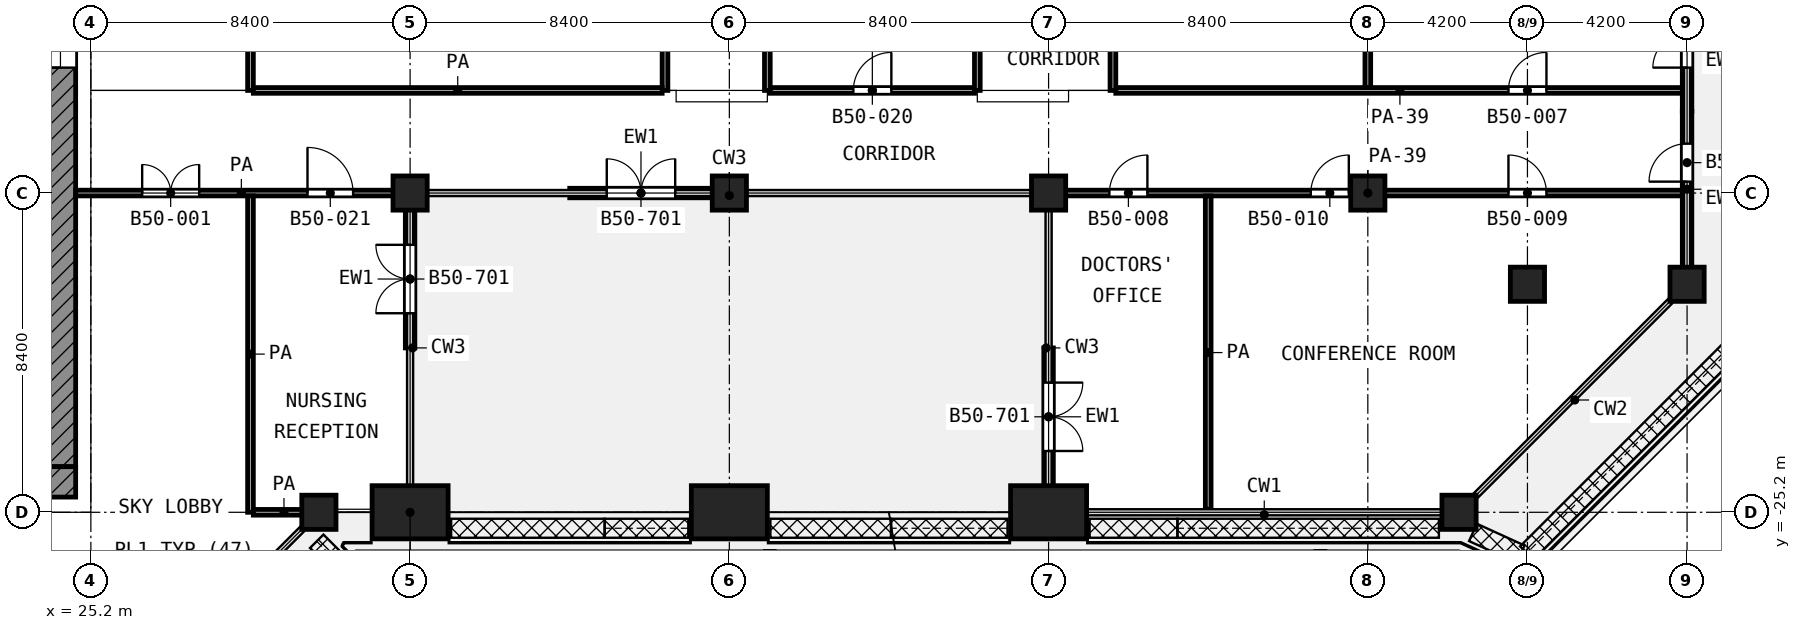
"""IFC4 building model, lengths in metres.
Left out: names, types, materials, properties, quantities, classifications, styles, units other than length and angle.
Written with IfcOpenShell. Run it as: python <this file> out.ifc"""

import sys

from ifc_helpers import new_model, si_unit, direction, frame, frame_2d, origin, origin_2d, place, context, subcontext, project, spatial, rectangle, extrude, element, fill, save


model = new_model("IFC4")
c1 = context("Model", 3, precision=1e-05, world=origin(), true_north=direction((0.0, 1.0)))
c2 = subcontext(c1, "Body", "Model", "MODEL_VIEW")
j1 = project(units=[si_unit("LENGTHUNIT", "METRE"), si_unit("PLANEANGLEUNIT", "RADIAN")], contexts=[c1])
p1 = place(None, origin())
s1 = spatial("IfcSite", under=j1, at=p1, CompositionType="ELEMENT")
p2 = place(p1, origin())
s2 = spatial("IfcBuilding", under=s1, at=p2, CompositionType="ELEMENT")
p3 = place(p2, frame((0.0, 0.0, 218.0)))
s3 = spatial("IfcBuildingStorey", under=s2, at=p3, CompositionType="ELEMENT", Elevation=218.0)
for number, where, z_axis, x_axis in (
    (1, (33.6, -16.8, 0.0), (0.0, 0.0, 1.0), (1.0, 0.0, 0.0)),
    (2, (42.0, -16.8, 0.0), (0.0, 0.0, 1.0), (1.0, 0.0, 0.0)),
    (3, (50.4, -16.8, 0.0), (0.0, 0.0, 1.0), (1.0, 0.0, 0.0)),
    (4, (58.8, -16.8, 0.0), (0.0, 0.0, 1.0), (1.0, 0.0, 0.0)),
    (5, (63.0, -19.2, 0.0), (0.0, 0.0, 1.0), (1.0, 0.0, 0.0)),
    (6, (67.2, -19.2, 0.0), (0.0, 0.0, 1.0), (1.0, 0.0, 0.0)),
    (7, (31.2, -25.2, 0.0), (0.0, 0.0, 1.0), (1.0, 0.0, 0.0)),
):
    element("IfcColumn", number, at=place(p3, frame(where, z_axis=z_axis, x_axis=x_axis)), inside=s3, PredefinedType="COLUMN", context=c2, shape_type="SweptSolid", body=[
        extrude(rectangle(XDim=0.9, YDim=0.9, at=origin_2d()), origin(), (0.0, 0.0, 1.0), 4.2),
    ])
for number, where, z_axis, x_axis in (
    (8, (42.0, -25.2, 0.0), (0.0, 0.0, 1.0), (-1.0, 0.0, 0.0)),
    (9, (50.4, -25.2, 0.0), (0.0, 0.0, 1.0), (-1.0, 0.0, 0.0)),
):
    element("IfcColumn", number, at=place(p3, frame(where, z_axis=z_axis, x_axis=x_axis)), inside=s3, PredefinedType="COLUMN", context=c2, shape_type="SweptSolid", body=[
        extrude(rectangle(XDim=2.0, YDim=1.4, at=origin_2d()), origin(), (0.0, 0.0, 1.0), 4.2),
    ])
p4 = place(p3, frame((61.2, -25.2, 0.0), z_axis=(0.0, 0.0, 1.0), x_axis=(1.0, 0.0, 0.0)))
e10 = element("IfcColumn", 10, at=p4, inside=s3, PredefinedType="COLUMN", context=c2, shape_type="SweptSolid", body=[
    extrude(rectangle(XDim=0.9, YDim=0.9, at=origin_2d()), origin(), (0.0, 0.0, 1.0), 4.2),
])
p5 = place(p3, frame((33.6, -25.2, 0.0), z_axis=(0.0, 0.0, 1.0), x_axis=(-1.0, 0.0, 0.0)))
e11 = element("IfcColumn", 11, at=p5, inside=s3, PredefinedType="COLUMN", context=c2, shape_type="SweptSolid", body=[
    extrude(rectangle(XDim=2.0, YDim=1.4, at=origin_2d()), origin(), (0.0, 0.0, 1.0), 4.2),
])
p6 = place(p3, frame((33.6, -20.875, 0.0), z_axis=(0.0, 0.0, 1.0), x_axis=(0.0, 1.0, 0.0)))
e12 = element("IfcWall", 12, at=p6, inside=s3, PredefinedType="SOLIDWALL", context=c2, shape_type="SweptSolid", body=[
    extrude(rectangle(XDim=3.625, YDim=0.25, at=frame_2d((1.812, 0.0))), origin(), (0.0, 0.0, 1.0), 3.46),
])
p7 = place(p6, frame((0.913, 0.0, 0.0)))
e13 = element("IfcOpeningElement", 13, at=p7, cuts=e12, PredefinedType="OPENING", context=c2, shape_type="SweptSolid", body=[
    extrude(rectangle(XDim=1.8, YDim=2.1, at=frame_2d((0.9, 1.05))), frame((0.0, 0.135, 0.0), z_axis=(0.0, -1.0, 0.0), x_axis=(1.0, 0.0, 0.0)), (0.0, 0.0, 1.0), 0.27),
])
p8 = place(p3, frame((37.8, -16.8, 0.0), z_axis=(0.0, 0.0, 1.0), x_axis=(1.0, 0.0, 0.0)))
e14 = element("IfcWall", 14, at=p8, inside=s3, PredefinedType="SOLIDWALL", context=c2, shape_type="SweptSolid", body=[
    extrude(rectangle(XDim=3.75, YDim=0.25, at=frame_2d((1.875, 0.0))), origin(), (0.0, 0.0, 1.0), 3.46),
])
p9 = place(p8, frame((0.975, 0.0, 0.0)))
e15 = element("IfcOpeningElement", 15, at=p9, cuts=e14, PredefinedType="OPENING", context=c2, shape_type="SweptSolid", body=[
    extrude(rectangle(XDim=1.8, YDim=2.1, at=frame_2d((0.9, 1.05))), frame((0.0, 0.135, 0.0), z_axis=(0.0, -1.0, 0.0), x_axis=(1.0, 0.0, 0.0)), (0.0, 0.0, 1.0), 0.27),
])
p10 = place(p3, frame((50.4, -20.875, 0.0), z_axis=(0.0, 0.0, 1.0), x_axis=(0.0, -1.0, 0.0)))
e16 = element("IfcWall", 16, at=p10, inside=s3, PredefinedType="SOLIDWALL", context=c2, shape_type="SweptSolid", body=[
    extrude(rectangle(XDim=3.625, YDim=0.25, at=frame_2d((1.812, 0.0))), origin(), (0.0, 0.0, 1.0), 3.46),
])
p11 = place(p10, frame((0.913, 0.0, 0.0)))
e17 = element("IfcOpeningElement", 17, at=p11, cuts=e16, PredefinedType="OPENING", context=c2, shape_type="SweptSolid", body=[
    extrude(rectangle(XDim=1.8, YDim=2.1, at=frame_2d((0.9, 1.05))), frame((0.0, 0.135, 0.0), z_axis=(0.0, -1.0, 0.0), x_axis=(1.0, 0.0, 0.0)), (0.0, 0.0, 1.0), 0.27),
])
p12 = place(p3, frame((67.2, -18.75, 0.0), z_axis=(0.0, 0.0, 1.0), x_axis=(0.0, 1.0, 0.0)))
e18 = element("IfcWall", 18, at=p12, inside=s3, PredefinedType="SOLIDWALL", context=c2, shape_type="SweptSolid", body=[
    extrude(rectangle(XDim=4.1, YDim=0.25, at=frame_2d((2.05, 0.0))), origin(), (0.0, 0.0, 1.0), 2.58),
])
p13 = place(p12, frame((2.25, 0.0, 0.0)))
e19 = element("IfcOpeningElement", 19, at=p13, cuts=e18, PredefinedType="OPENING", context=c2, shape_type="SweptSolid", body=[
    extrude(rectangle(XDim=1.0, YDim=2.1, at=frame_2d((0.5, 1.05))), frame((0.0, 0.135, 0.0), z_axis=(0.0, -1.0, 0.0), x_axis=(1.0, 0.0, 0.0)), (0.0, 0.0, 1.0), 0.27),
])
p14 = place(p3, frame((67.2, -14.65, 0.0), z_axis=(0.0, 0.0, 1.0), x_axis=(0.0, 1.0, 0.0)))
e20 = element("IfcWall", 20, at=p14, inside=s3, PredefinedType="SOLIDWALL", context=c2, shape_type="SweptSolid", body=[
    extrude(rectangle(XDim=4.1, YDim=0.25, at=frame_2d((2.05, 0.0))), origin(), (0.0, 0.0, 1.0), 2.58),
])
p15 = place(p14, frame((1.15, 0.0, 0.0)))
e21 = element("IfcOpeningElement", 21, at=p15, cuts=e20, PredefinedType="OPENING", context=c2, shape_type="SweptSolid", body=[
    extrude(rectangle(XDim=1.8, YDim=2.1, at=frame_2d((0.9, 1.05))), frame((0.0, 0.135, 0.0), z_axis=(0.0, -1.0, 0.0), x_axis=(1.0, 0.0, 0.0)), (0.0, 0.0, 1.0), 0.27),
])
p16 = place(p3, frame((24.4, -24.0, 0.0), z_axis=(0.0, 0.0, 1.0), x_axis=(0.0, 1.0, 0.0)))
e22 = element("IfcWall", 22, at=p16, inside=s3, PredefinedType="SHEAR", context=c2, shape_type="SweptSolid", body=[
    extrude(rectangle(XDim=18.6, YDim=0.8, at=frame_2d((9.3, 0.0))), origin(), (0.0, 0.0, 1.0), 3.6),
])
p17 = place(p16, frame((10.5, 0.0, 0.0)))
e23 = element("IfcOpeningElement", 23, at=p17, cuts=e22, PredefinedType="OPENING", context=c2, shape_type="SweptSolid", body=[
    extrude(rectangle(XDim=1.8, YDim=2.1, at=frame_2d((0.9, 1.05))), frame((0.0, 0.41, 0.0), z_axis=(0.0, -1.0, 0.0), x_axis=(1.0, 0.0, 0.0)), (0.0, 0.0, 1.0), 0.82),
])
p18 = place(p3, frame((24.4, -24.8, 0.0), z_axis=(0.0, 0.0, 1.0), x_axis=(0.0, 1.0, 0.0)))
e24 = element("IfcWall", 24, at=p18, inside=s3, PredefinedType="SHEAR", context=c2, shape_type="SweptSolid", body=[
    extrude(rectangle(XDim=0.8, YDim=0.8, at=frame_2d((0.4, 0.0))), origin(), (0.0, 0.0, 1.0), 3.6),
])
p19 = place(p3, frame((29.475, -25.2, 0.0), z_axis=(0.0, 0.0, 1.0), x_axis=(1.0, 0.0, 0.0)))
e25 = element("IfcWall", 25, at=p19, inside=s3, PredefinedType="PARTITIONING", context=c2, shape_type="SweptSolid", body=[
    extrude(rectangle(XDim=1.612, YDim=0.15, at=frame_2d((0.806, 0.0))), origin(), (0.0, 0.0, 1.0), 3.6),
])
p20 = place(p3, frame((24.8, -16.8, 0.0), z_axis=(0.0, 0.0, 1.0), x_axis=(1.0, 0.0, 0.0)))
e26 = element("IfcWall", 26, at=p20, inside=s3, PredefinedType="PARTITIONING", context=c2, shape_type="SweptSolid", body=[
    extrude(rectangle(XDim=8.72, YDim=0.15, at=frame_2d((4.36, 0.0))), origin(), (0.0, 0.0, 1.0), 3.6),
])
p21 = place(p20, frame((1.75, 0.0, 0.0)))
e27 = element("IfcOpeningElement", 27, at=p21, cuts=e26, PredefinedType="OPENING", context=c2, shape_type="SweptSolid", body=[
    extrude(rectangle(XDim=1.5, YDim=2.1, at=frame_2d((0.75, 1.05))), frame((0.0, 0.085, 0.0), z_axis=(0.0, -1.0, 0.0), x_axis=(1.0, 0.0, 0.0)), (0.0, 0.0, 1.0), 0.17),
])
p22 = place(p20, frame((6.1, 0.0, 0.0)))
e28 = element("IfcOpeningElement", 28, at=p22, cuts=e26, PredefinedType="OPENING", context=c2, shape_type="SweptSolid", body=[
    extrude(rectangle(XDim=1.2, YDim=2.1, at=frame_2d((0.6, 1.05))), frame((0.0, 0.085, 0.0), z_axis=(0.0, -1.0, 0.0), x_axis=(1.0, 0.0, 0.0)), (0.0, 0.0, 1.0), 0.17),
])
p23 = place(p3, frame((50.48, -16.8, 0.0), z_axis=(0.0, 0.0, 1.0), x_axis=(1.0, 0.0, 0.0)))
e29 = element("IfcWall", 29, at=p23, inside=s3, PredefinedType="PARTITIONING", context=c2, shape_type="SweptSolid", body=[
    extrude(rectangle(XDim=16.64, YDim=0.15, at=frame_2d((8.32, 0.0))), origin(), (0.0, 0.0, 1.0), 2.7),
])
p24 = place(p23, frame((1.52, 0.0, 0.0)))
e30 = element("IfcOpeningElement", 30, at=p24, cuts=e29, PredefinedType="OPENING", context=c2, shape_type="SweptSolid", body=[
    extrude(rectangle(XDim=1.0, YDim=2.1, at=frame_2d((0.5, 1.05))), frame((0.0, 0.085, 0.0), z_axis=(0.0, -1.0, 0.0), x_axis=(1.0, 0.0, 0.0)), (0.0, 0.0, 1.0), 0.17),
])
p25 = place(p23, frame((12.02, 0.0, 0.0)))
e31 = element("IfcOpeningElement", 31, at=p25, cuts=e29, PredefinedType="OPENING", context=c2, shape_type="SweptSolid", body=[
    extrude(rectangle(XDim=1.0, YDim=2.1, at=frame_2d((0.5, 1.05))), frame((0.0, 0.085, 0.0), z_axis=(0.0, -1.0, 0.0), x_axis=(1.0, 0.0, 0.0)), (0.0, 0.0, 1.0), 0.17),
])
p26 = place(p23, frame((6.82, 0.0, 0.0)))
e32 = element("IfcOpeningElement", 32, at=p26, cuts=e29, PredefinedType="OPENING", context=c2, shape_type="SweptSolid", body=[
    extrude(rectangle(XDim=1.0, YDim=2.1, at=frame_2d((0.5, 1.05))), frame((0.0, 0.085, 0.0), z_axis=(0.0, -1.0, 0.0), x_axis=(1.0, 0.0, 0.0)), (0.0, 0.0, 1.0), 0.17),
])
p27 = place(p3, frame((29.475, -14.1, 0.0), z_axis=(0.0, 0.0, 1.0), x_axis=(1.0, 0.0, 0.0)))
e33 = element("IfcWall", 33, at=p27, inside=s3, PredefinedType="PARTITIONING", context=c2, shape_type="SweptSolid", body=[
    extrude(rectangle(XDim=10.757, YDim=0.15, at=frame_2d((5.378, 0.0))), origin(), (0.0, 0.0, 1.0), 3.6),
])
p28 = place(p3, frame((43.075, -14.1, 0.0), z_axis=(0.0, 0.0, 1.0), x_axis=(1.0, 0.0, 0.0)))
e34 = element("IfcWall", 34, at=p28, inside=s3, PredefinedType="PARTITIONING", context=c2, shape_type="SweptSolid", body=[
    extrude(rectangle(XDim=5.375, YDim=0.15, at=frame_2d((2.688, 0.0))), origin(), (0.0, 0.0, 1.0), 3.6),
])
p29 = place(p28, frame((2.188, 0.0, 0.0)))
e35 = element("IfcOpeningElement", 35, at=p29, cuts=e34, PredefinedType="OPENING", context=c2, shape_type="SweptSolid", body=[
    extrude(rectangle(XDim=1.0, YDim=2.1, at=frame_2d((0.5, 1.05))), frame((0.0, 0.085, 0.0), z_axis=(0.0, -1.0, 0.0), x_axis=(1.0, 0.0, 0.0)), (0.0, 0.0, 1.0), 0.17),
])
p30 = place(p3, frame((52.168, -14.1, 0.0), z_axis=(0.0, 0.0, 1.0), x_axis=(1.0, 0.0, 0.0)))
e36 = element("IfcWall", 36, at=p30, inside=s3, PredefinedType="PARTITIONING", context=c2, shape_type="SweptSolid", body=[
    extrude(rectangle(XDim=14.952, YDim=0.15, at=frame_2d((7.476, 0.0))), origin(), (0.0, 0.0, 1.0), 2.7),
])
p31 = place(p30, frame((10.332, 0.0, 0.0)))
e37 = element("IfcOpeningElement", 37, at=p31, cuts=e36, PredefinedType="OPENING", context=c2, shape_type="SweptSolid", body=[
    extrude(rectangle(XDim=1.0, YDim=2.1, at=frame_2d((0.5, 1.05))), frame((0.0, 0.085, 0.0), z_axis=(0.0, -1.0, 0.0), x_axis=(1.0, 0.0, 0.0)), (0.0, 0.0, 1.0), 0.17),
])
p32 = place(p3, frame((29.4, -25.2, 0.0), z_axis=(0.0, 0.0, 1.0), x_axis=(0.0, 1.0, 0.0)))
e38 = element("IfcWall", 38, at=p32, inside=s3, PredefinedType="PARTITIONING", context=c2, shape_type="SweptSolid", body=[
    extrude(rectangle(XDim=8.325, YDim=0.15, at=frame_2d((4.163, 0.0))), origin(), (0.0, 0.0, 1.0), 3.6),
])
p33 = place(p3, frame((29.4, -14.1, 0.0), z_axis=(0.0, 0.0, 1.0), x_axis=(0.0, 1.0, 0.0)))
e39 = element("IfcWall", 39, at=p33, inside=s3, PredefinedType="PARTITIONING", context=c2, shape_type="SweptSolid", body=[
    extrude(rectangle(XDim=14.02, YDim=0.15, at=frame_2d((7.01, 0.0))), origin(), (0.0, 0.0, 1.0), 3.6),
])
p34 = place(p3, frame((40.307, -14.1, 0.0), z_axis=(0.0, 0.0, 1.0), x_axis=(0.0, 1.0, 0.0)))
e40 = element("IfcWall", 40, at=p34, inside=s3, PredefinedType="PARTITIONING", context=c2, shape_type="SweptSolid", body=[
    extrude(rectangle(XDim=14.02, YDim=0.15, at=frame_2d((7.01, 0.0))), origin(), (0.0, 0.0, 1.0), 3.6),
])
p35 = place(p34, frame((4.2, 0.0, 0.0)))
e41 = element("IfcOpeningElement", 41, at=p35, cuts=e40, PredefinedType="OPENING", context=c2, shape_type="SweptSolid", body=[
    extrude(rectangle(XDim=1.0, YDim=2.1, at=frame_2d((0.5, 1.05))), frame((0.0, 0.085, 0.0), z_axis=(0.0, -1.0, 0.0), x_axis=(1.0, 0.0, 0.0)), (0.0, 0.0, 1.0), 0.17),
])
p36 = place(p34, frame((8.9, 0.0, 0.0)))
e42 = element("IfcOpeningElement", 42, at=p36, cuts=e40, PredefinedType="OPENING", context=c2, shape_type="SweptSolid", body=[
    extrude(rectangle(XDim=1.0, YDim=2.1, at=frame_2d((0.5, 1.05))), frame((0.0, 0.085, 0.0), z_axis=(0.0, -1.0, 0.0), x_axis=(1.0, 0.0, 0.0)), (0.0, 0.0, 1.0), 0.17),
])
p37 = place(p3, frame((43.0, -14.1, 0.0), z_axis=(0.0, 0.0, 1.0), x_axis=(0.0, 1.0, 0.0)))
e43 = element("IfcWall", 43, at=p37, inside=s3, PredefinedType="PARTITIONING", context=c2, shape_type="SweptSolid", body=[
    extrude(rectangle(XDim=5.25, YDim=0.15, at=frame_2d((2.625, 0.0))), origin(), (0.0, 0.0, 1.0), 3.6),
])
p38 = place(p3, frame((48.525, -14.1, 0.0), z_axis=(0.0, 0.0, 1.0), x_axis=(0.0, 1.0, 0.0)))
e44 = element("IfcWall", 44, at=p38, inside=s3, PredefinedType="PARTITIONING", context=c2, shape_type="SweptSolid", body=[
    extrude(rectangle(XDim=5.37, YDim=0.15, at=frame_2d((2.685, 0.0))), origin(), (0.0, 0.0, 1.0), 3.6),
])
p39 = place(p3, frame((52.093, -14.1, 0.0), z_axis=(0.0, 0.0, 1.0), x_axis=(0.0, 1.0, 0.0)))
e45 = element("IfcWall", 45, at=p39, inside=s3, PredefinedType="PARTITIONING", context=c2, shape_type="SweptSolid", body=[
    extrude(rectangle(XDim=12.248, YDim=0.15, at=frame_2d((6.124, 0.0))), origin(), (0.0, 0.0, 1.0), 3.6),
])
p40 = place(p39, frame((7.665, 0.0, 0.0)))
e46 = element("IfcOpeningElement", 46, at=p40, cuts=e45, PredefinedType="OPENING", context=c2, shape_type="SweptSolid", body=[
    extrude(rectangle(XDim=1.0, YDim=2.1, at=frame_2d((0.5, 1.05))), frame((0.0, 0.085, 0.0), z_axis=(0.0, -1.0, 0.0), x_axis=(1.0, 0.0, 0.0)), (0.0, 0.0, 1.0), 0.17),
])
p41 = place(p39, frame((3.583, 0.0, 0.0)))
e47 = element("IfcOpeningElement", 47, at=p41, cuts=e45, PredefinedType="OPENING", context=c2, shape_type="SweptSolid", body=[
    extrude(rectangle(XDim=1.0, YDim=2.1, at=frame_2d((0.5, 1.05))), frame((0.0, 0.085, 0.0), z_axis=(0.0, -1.0, 0.0), x_axis=(1.0, 0.0, 0.0)), (0.0, 0.0, 1.0), 0.17),
])
p42 = place(p3, frame((54.6, -25.12, 0.0), z_axis=(0.0, 0.0, 1.0), x_axis=(0.0, 1.0, 0.0)))
e48 = element("IfcWall", 48, at=p42, inside=s3, PredefinedType="PARTITIONING", context=c2, shape_type="SweptSolid", body=[
    extrude(rectangle(XDim=8.245, YDim=0.15, at=frame_2d((4.123, 0.0))), origin(), (0.0, 0.0, 1.0), 3.6),
])
p43 = place(p3, frame((58.8, -14.025, 0.0), z_axis=(0.0, 0.0, 1.0), x_axis=(0.0, 1.0, 0.0)))
e49 = element("IfcWall", 49, at=p43, inside=s3, PredefinedType="PARTITIONING", context=c2, shape_type="SweptSolid", body=[
    extrude(rectangle(XDim=13.945, YDim=0.15, at=frame_2d((6.972, 0.0))), origin(), (0.0, 0.0, 1.0), 3.6),
])
p44 = place(p7, origin())
e50 = element("IfcDoor", 50, at=p44, inside=s3, OperationType="DOUBLE_DOOR_SINGLE_SWING", PredefinedType="DOOR", context=c2, shape_type="SweptSolid", body=[
    extrude(rectangle(XDim=1.8, YDim=2.1, at=frame_2d((0.9, 1.05))), frame((0.0, 0.025, 0.0), z_axis=(0.0, -1.0, 0.0), x_axis=(1.0, 0.0, 0.0)), (0.0, 0.0, 1.0), 0.05),
])
fill(e13, e50)
p45 = place(p9, origin())
e51 = element("IfcDoor", 51, at=p45, inside=s3, OperationType="DOUBLE_DOOR_SINGLE_SWING", PredefinedType="DOOR", context=c2, shape_type="SweptSolid", body=[
    extrude(rectangle(XDim=1.8, YDim=2.1, at=frame_2d((0.9, 1.05))), frame((0.0, 0.025, 0.0), z_axis=(0.0, -1.0, 0.0), x_axis=(1.0, 0.0, 0.0)), (0.0, 0.0, 1.0), 0.05),
])
fill(e15, e51)
p46 = place(p11, origin())
e52 = element("IfcDoor", 52, at=p46, inside=s3, OperationType="DOUBLE_DOOR_SINGLE_SWING", PredefinedType="DOOR", context=c2, shape_type="SweptSolid", body=[
    extrude(rectangle(XDim=1.8, YDim=2.1, at=frame_2d((0.9, 1.05))), frame((0.0, 0.025, 0.0), z_axis=(0.0, -1.0, 0.0), x_axis=(1.0, 0.0, 0.0)), (0.0, 0.0, 1.0), 0.05),
])
fill(e17, e52)
p47 = place(p13, origin())
e53 = element("IfcDoor", 53, at=p47, inside=s3, OperationType="SINGLE_SWING_LEFT", PredefinedType="DOOR", context=c2, shape_type="SweptSolid", body=[
    extrude(rectangle(XDim=1.0, YDim=2.1, at=frame_2d((0.5, 1.05))), frame((0.0, 0.025, 0.0), z_axis=(0.0, -1.0, 0.0), x_axis=(1.0, 0.0, 0.0)), (0.0, 0.0, 1.0), 0.05),
])
fill(e19, e53)
p48 = place(p15, origin())
e54 = element("IfcDoor", 54, at=p48, inside=s3, OperationType="DOUBLE_DOOR_SINGLE_SWING", PredefinedType="DOOR", context=c2, shape_type="SweptSolid", body=[
    extrude(rectangle(XDim=1.8, YDim=2.1, at=frame_2d((0.9, 1.05))), frame((0.0, 0.025, 0.0), z_axis=(0.0, -1.0, 0.0), x_axis=(1.0, 0.0, 0.0)), (0.0, 0.0, 1.0), 0.05),
])
fill(e21, e54)
p49 = place(p17, origin())
e55 = element("IfcDoor", 55, at=p49, inside=s3, OperationType="DOUBLE_DOOR_SINGLE_SWING", PredefinedType="DOOR", context=c2, shape_type="SweptSolid", body=[
    extrude(rectangle(XDim=1.8, YDim=2.1, at=frame_2d((0.9, 1.05))), frame((0.0, 0.025, 0.0), z_axis=(0.0, -1.0, 0.0), x_axis=(1.0, 0.0, 0.0)), (0.0, 0.0, 1.0), 0.05),
])
fill(e23, e55)
p50 = place(p21, origin())
e56 = element("IfcDoor", 56, at=p50, inside=s3, OperationType="DOUBLE_DOOR_SINGLE_SWING", PredefinedType="DOOR", context=c2, shape_type="SweptSolid", body=[
    extrude(rectangle(XDim=1.5, YDim=2.1, at=frame_2d((0.75, 1.05))), frame((0.0, 0.025, 0.0), z_axis=(0.0, -1.0, 0.0), x_axis=(1.0, 0.0, 0.0)), (0.0, 0.0, 1.0), 0.05),
])
fill(e27, e56)
p51 = place(p31, origin())
e57 = element("IfcDoor", 57, at=p51, inside=s3, OperationType="SINGLE_SWING_RIGHT", PredefinedType="DOOR", context=c2, shape_type="SweptSolid", body=[
    extrude(rectangle(XDim=1.0, YDim=2.1, at=frame_2d((0.5, 1.05))), frame((0.0, 0.025, 0.0), z_axis=(0.0, -1.0, 0.0), x_axis=(1.0, 0.0, 0.0)), (0.0, 0.0, 1.0), 0.05),
])
fill(e37, e57)
p52 = place(p22, origin())
e58 = element("IfcDoor", 58, at=p52, inside=s3, OperationType="SINGLE_SWING_LEFT", PredefinedType="DOOR", context=c2, shape_type="SweptSolid", body=[
    extrude(rectangle(XDim=1.2, YDim=2.1, at=frame_2d((0.6, 1.05))), frame((0.0, 0.025, 0.0), z_axis=(0.0, -1.0, 0.0), x_axis=(1.0, 0.0, 0.0)), (0.0, 0.0, 1.0), 0.05),
])
fill(e28, e58)
p53 = place(p24, origin())
e59 = element("IfcDoor", 59, at=p53, inside=s3, OperationType="SINGLE_SWING_RIGHT", PredefinedType="DOOR", context=c2, shape_type="SweptSolid", body=[
    extrude(rectangle(XDim=1.0, YDim=2.1, at=frame_2d((0.5, 1.05))), frame((0.0, 0.025, 0.0), z_axis=(0.0, -1.0, 0.0), x_axis=(1.0, 0.0, 0.0)), (0.0, 0.0, 1.0), 0.05),
])
fill(e30, e59)
p54 = place(p25, origin())
e60 = element("IfcDoor", 60, at=p54, inside=s3, OperationType="SINGLE_SWING_LEFT", PredefinedType="DOOR", context=c2, shape_type="SweptSolid", body=[
    extrude(rectangle(XDim=1.0, YDim=2.1, at=frame_2d((0.5, 1.05))), frame((0.0, 0.025, 0.0), z_axis=(0.0, -1.0, 0.0), x_axis=(1.0, 0.0, 0.0)), (0.0, 0.0, 1.0), 0.05),
])
fill(e31, e60)
p55 = place(p26, origin())
e61 = element("IfcDoor", 61, at=p55, inside=s3, OperationType="SINGLE_SWING_RIGHT", PredefinedType="DOOR", context=c2, shape_type="SweptSolid", body=[
    extrude(rectangle(XDim=1.0, YDim=2.1, at=frame_2d((0.5, 1.05))), frame((0.0, 0.025, 0.0), z_axis=(0.0, -1.0, 0.0), x_axis=(1.0, 0.0, 0.0)), (0.0, 0.0, 1.0), 0.05),
])
fill(e32, e61)
p56 = place(p29, origin())
e62 = element("IfcDoor", 62, at=p56, inside=s3, OperationType="SINGLE_SWING_RIGHT", PredefinedType="DOOR", context=c2, shape_type="SweptSolid", body=[
    extrude(rectangle(XDim=1.0, YDim=2.1, at=frame_2d((0.5, 1.05))), frame((0.0, 0.025, 0.0), z_axis=(0.0, -1.0, 0.0), x_axis=(1.0, 0.0, 0.0)), (0.0, 0.0, 1.0), 0.05),
])
fill(e35, e62)
save(model, sys.argv[1])
